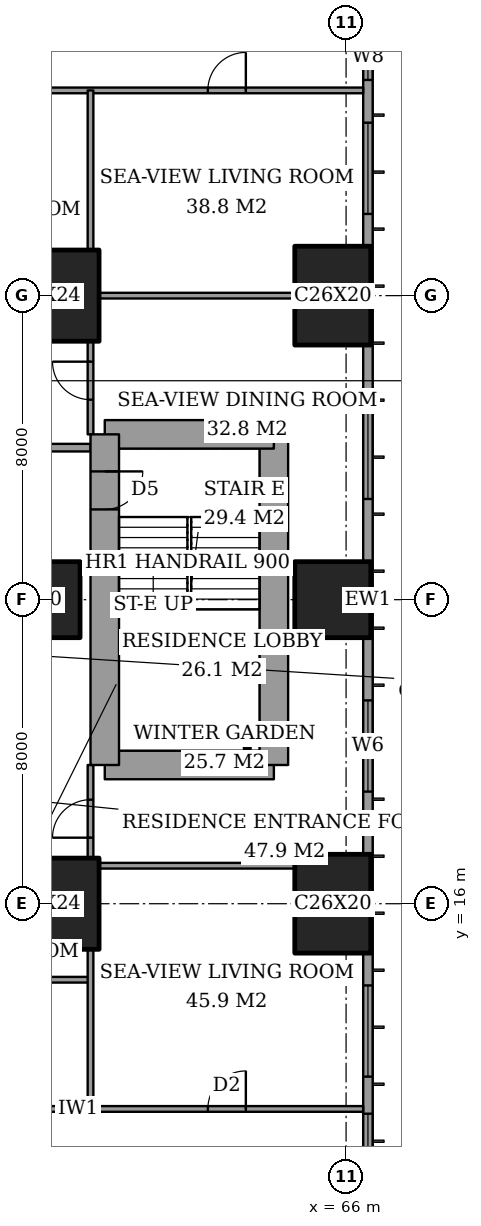
"""IFC4 building model, lengths in metres.
Left out: names, types, materials, properties, quantities, classifications, styles, units other than length and angle.
Written with IfcOpenShell. Run it as: python <this file> out.ifc"""

import sys

from ifc_helpers import new_model, si_unit, direction, frame, frame_2d, origin, origin_2d, place, context, subcontext, project, spatial, rectangle, extrude, element, fill, save


model = new_model("IFC4")
c1 = context("Model", 3, precision=1e-05, world=origin(), true_north=direction((0.0, 1.0)))
c2 = subcontext(c1, "Body", "Model", "MODEL_VIEW")
j1 = project(units=[si_unit("LENGTHUNIT", "METRE"), si_unit("PLANEANGLEUNIT", "RADIAN")], contexts=[c1])
p1 = place(None, origin())
s1 = spatial("IfcSite", under=j1, at=p1, CompositionType="ELEMENT")
p2 = place(p1, origin())
s2 = spatial("IfcBuilding", under=s1, at=p2, CompositionType="ELEMENT")
p3 = place(p2, frame((0.0, 0.0, 80.0)))
s3 = spatial("IfcBuildingStorey", under=s2, at=p3, CompositionType="ELEMENT", Elevation=80.0)
p4 = place(p3, frame((58.0, 16.0, 0.0), z_axis=(0.0, 0.0, 1.0), x_axis=(1.0, 0.0, 0.0)))
e1 = element("IfcColumn", 1, at=p4, inside=s3, PredefinedType="COLUMN", context=c2, shape_type="SweptSolid", body=[
    extrude(rectangle(XDim=3.0, YDim=2.4, at=origin_2d()), origin(), (0.0, 0.0, 1.0), 3.6),
])
p5 = place(p3, frame((58.0, 24.0, 0.0), z_axis=(0.0, 0.0, 1.0), x_axis=(1.0, 0.0, 0.0)))
e2 = element("IfcColumn", 2, at=p5, inside=s3, PredefinedType="COLUMN", context=c2, shape_type="SweptSolid", body=[
    extrude(rectangle(XDim=2.0, YDim=2.0, at=origin_2d()), origin(), (0.0, 0.0, 1.0), 3.6),
])
p6 = place(p3, frame((58.0, 32.0, 0.0), z_axis=(0.0, 0.0, 1.0), x_axis=(1.0, 0.0, 0.0)))
e3 = element("IfcColumn", 3, at=p6, inside=s3, PredefinedType="COLUMN", context=c2, shape_type="SweptSolid", body=[
    extrude(rectangle(XDim=3.0, YDim=2.4, at=origin_2d()), origin(), (0.0, 0.0, 1.0), 3.6),
])
p7 = place(p3, frame((65.65, 16.0, 0.0), z_axis=(0.0, 0.0, 1.0), x_axis=(0.0, 1.0, 0.0)))
e4 = element("IfcColumn", 4, at=p7, inside=s3, PredefinedType="COLUMN", context=c2, shape_type="SweptSolid", body=[
    extrude(rectangle(XDim=2.6, YDim=2.0, at=origin_2d()), origin(), (0.0, 0.0, 1.0), 3.6),
])
p8 = place(p3, frame((65.65, 24.0, 0.0), z_axis=(0.0, 0.0, 1.0), x_axis=(1.0, 0.0, 0.0)))
e5 = element("IfcColumn", 5, at=p8, inside=s3, PredefinedType="COLUMN", context=c2, shape_type="SweptSolid", body=[
    extrude(rectangle(XDim=2.0, YDim=2.0, at=origin_2d()), origin(), (0.0, 0.0, 1.0), 3.6),
])
p9 = place(p3, frame((65.65, 32.0, 0.0), z_axis=(0.0, 0.0, 1.0), x_axis=(0.0, 1.0, 0.0)))
e6 = element("IfcColumn", 6, at=p9, inside=s3, PredefinedType="COLUMN", context=c2, shape_type="SweptSolid", body=[
    extrude(rectangle(XDim=2.6, YDim=2.0, at=origin_2d()), origin(), (0.0, 0.0, 1.0), 3.6),
])
p10 = place(p3, frame((59.65, 19.65, 0.0), z_axis=(0.0, 0.0, 1.0), x_axis=(1.0, 0.0, 0.0)))
e7 = element("IfcWall", 7, at=p10, inside=s3, PredefinedType="SHEAR", context=c2, shape_type="SweptSolid", body=[
    extrude(rectangle(XDim=4.45, YDim=0.75, at=frame_2d((2.225, 0.0))), origin(), (0.0, 0.0, 1.0), 3.6),
])
p11 = place(p3, frame((64.1, 19.65, 0.0), z_axis=(0.0, 0.0, 1.0), x_axis=(0.0, 1.0, 0.0)))
e8 = element("IfcWall", 8, at=p11, inside=s3, PredefinedType="SHEAR", context=c2, shape_type="SweptSolid", body=[
    extrude(rectangle(XDim=8.7, YDim=0.75, at=frame_2d((4.35, 0.0))), origin(), (0.0, 0.0, 1.0), 3.6),
])
p12 = place(p3, frame((64.1, 28.35, 0.0), z_axis=(0.0, 0.0, 1.0), x_axis=(-1.0, 0.0, 0.0)))
e9 = element("IfcWall", 9, at=p12, inside=s3, PredefinedType="SHEAR", context=c2, shape_type="SweptSolid", body=[
    extrude(rectangle(XDim=4.45, YDim=0.75, at=frame_2d((2.225, 0.0))), origin(), (0.0, 0.0, 1.0), 3.6),
])
p13 = place(p3, frame((59.65, 28.35, 0.0), z_axis=(0.0, 0.0, 1.0), x_axis=(0.0, -1.0, 0.0)))
e10 = element("IfcWall", 10, at=p13, inside=s3, PredefinedType="SHEAR", context=c2, shape_type="SweptSolid", body=[
    extrude(rectangle(XDim=8.7, YDim=0.75, at=frame_2d((4.35, 0.0))), origin(), (0.0, 0.0, 1.0), 3.6),
])
p14 = place(p13, frame((0.975, 0.0, 0.0)))
e11 = element("IfcOpeningElement", 11, at=p14, cuts=e10, PredefinedType="OPENING", context=c2, shape_type="SweptSolid", body=[
    extrude(rectangle(XDim=1.0, YDim=2.1, at=frame_2d((0.5, 1.05))), frame((0.0, 0.385, 0.0), z_axis=(0.0, -1.0, 0.0), x_axis=(1.0, 0.0, 0.0)), (0.0, 0.0, 1.0), 0.77),
])
p15 = place(p3, frame((66.575, 3.175, 0.0), z_axis=(0.0, 0.0, 1.0), x_axis=(0.0, 1.0, 0.0)))
e12 = element("IfcWall", 12, at=p15, inside=s3, PredefinedType="SOLIDWALL", context=c2, shape_type="SweptSolid", body=[
    extrude(rectangle(XDim=41.65, YDim=0.25, at=frame_2d((20.825, 0.0))), origin(), (0.0, 0.0, 1.0), 3.6),
])
p16 = place(p15, frame((0.775, 0.0, 0.6)))
e13 = element("IfcOpeningElement", 13, at=p16, cuts=e12, PredefinedType="OPENING", context=c2, shape_type="SweptSolid", body=[
    extrude(rectangle(XDim=2.4, YDim=2.0, at=frame_2d((1.2, 1.0))), frame((0.0, 0.135, 0.0), z_axis=(0.0, -1.0, 0.0), x_axis=(1.0, 0.0, 0.0)), (0.0, 0.0, 1.0), 0.27),
])
p17 = place(p15, frame((6.1, 0.0, 0.6)))
e14 = element("IfcOpeningElement", 14, at=p17, cuts=e12, PredefinedType="OPENING", context=c2, shape_type="SweptSolid", body=[
    extrude(rectangle(XDim=1.2, YDim=2.0, at=frame_2d((0.6, 1.0))), frame((0.0, 0.135, 0.0), z_axis=(0.0, -1.0, 0.0), x_axis=(1.0, 0.0, 0.0)), (0.0, 0.0, 1.0), 0.27),
])
p18 = place(p15, frame((8.275, 0.0, 0.6)))
e15 = element("IfcOpeningElement", 15, at=p18, cuts=e12, PredefinedType="OPENING", context=c2, shape_type="SweptSolid", body=[
    extrude(rectangle(XDim=2.4, YDim=2.0, at=frame_2d((1.2, 1.0))), frame((0.0, 0.135, 0.0), z_axis=(0.0, -1.0, 0.0), x_axis=(1.0, 0.0, 0.0)), (0.0, 0.0, 1.0), 0.27),
])
p19 = place(p15, frame((15.775, 0.0, 0.6)))
e16 = element("IfcOpeningElement", 16, at=p19, cuts=e12, PredefinedType="OPENING", context=c2, shape_type="SweptSolid", body=[
    extrude(rectangle(XDim=2.4, YDim=2.0, at=frame_2d((1.2, 1.0))), frame((0.0, 0.135, 0.0), z_axis=(0.0, -1.0, 0.0), x_axis=(1.0, 0.0, 0.0)), (0.0, 0.0, 1.0), 0.27),
])
p20 = place(p15, frame((23.475, 0.0, 0.6)))
e17 = element("IfcOpeningElement", 17, at=p20, cuts=e12, PredefinedType="OPENING", context=c2, shape_type="SweptSolid", body=[
    extrude(rectangle(XDim=2.4, YDim=2.0, at=frame_2d((1.2, 1.0))), frame((0.0, 0.135, 0.0), z_axis=(0.0, -1.0, 0.0), x_axis=(1.0, 0.0, 0.0)), (0.0, 0.0, 1.0), 0.27),
])
p21 = place(p15, frame((30.975, 0.0, 0.6)))
e18 = element("IfcOpeningElement", 18, at=p21, cuts=e12, PredefinedType="OPENING", context=c2, shape_type="SweptSolid", body=[
    extrude(rectangle(XDim=2.4, YDim=2.0, at=frame_2d((1.2, 1.0))), frame((0.0, 0.135, 0.0), z_axis=(0.0, -1.0, 0.0), x_axis=(1.0, 0.0, 0.0)), (0.0, 0.0, 1.0), 0.27),
])
p22 = place(p15, frame((34.5, 0.0, 0.6)))
e19 = element("IfcOpeningElement", 19, at=p22, cuts=e12, PredefinedType="OPENING", context=c2, shape_type="SweptSolid", body=[
    extrude(rectangle(XDim=1.2, YDim=2.0, at=frame_2d((0.6, 1.0))), frame((0.0, 0.135, 0.0), z_axis=(0.0, -1.0, 0.0), x_axis=(1.0, 0.0, 0.0)), (0.0, 0.0, 1.0), 0.27),
])
p23 = place(p15, frame((38.475, 0.0, 0.6)))
e20 = element("IfcOpeningElement", 20, at=p23, cuts=e12, PredefinedType="OPENING", context=c2, shape_type="SweptSolid", body=[
    extrude(rectangle(XDim=2.4, YDim=2.0, at=frame_2d((1.2, 1.0))), frame((0.0, 0.135, 0.0), z_axis=(0.0, -1.0, 0.0), x_axis=(1.0, 0.0, 0.0)), (0.0, 0.0, 1.0), 0.27),
])
p24 = place(p3, frame((41.439, 10.6, 0.0), z_axis=(0.0, 0.0, 1.0), x_axis=(1.0, 0.0, 0.0)))
e21 = element("IfcWall", 21, at=p24, inside=s3, PredefinedType="PARTITIONING", context=c2, shape_type="SweptSolid", body=[
    extrude(rectangle(XDim=25.011, YDim=0.15, at=frame_2d((12.505, 0.0))), origin(), (0.0, 0.0, 1.0), 3.35),
])
p25 = place(p24, frame((10.761, 0.0, 0.0)))
e22 = element("IfcOpeningElement", 22, at=p25, cuts=e21, PredefinedType="OPENING", context=c2, shape_type="SweptSolid", body=[
    extrude(rectangle(XDim=1.0, YDim=2.1, at=frame_2d((0.5, 1.05))), frame((0.0, 0.085, 0.0), z_axis=(0.0, -1.0, 0.0), x_axis=(1.0, 0.0, 0.0)), (0.0, 0.0, 1.0), 0.17),
])
p26 = place(p24, frame((20.924, 0.0, 0.0)))
e23 = element("IfcOpeningElement", 23, at=p26, cuts=e21, PredefinedType="OPENING", context=c2, shape_type="SweptSolid", body=[
    extrude(rectangle(XDim=1.0, YDim=2.1, at=frame_2d((0.5, 1.05))), frame((0.0, 0.085, 0.0), z_axis=(0.0, -1.0, 0.0), x_axis=(1.0, 0.0, 0.0)), (0.0, 0.0, 1.0), 0.17),
])
p27 = place(p24, frame((15.749, 0.0, 0.0)))
e24 = element("IfcOpeningElement", 24, at=p27, cuts=e21, PredefinedType="OPENING", context=c2, shape_type="SweptSolid", body=[
    extrude(rectangle(XDim=0.9, YDim=2.1, at=frame_2d((0.45, 1.05))), frame((0.0, 0.085, 0.0), z_axis=(0.0, -1.0, 0.0), x_axis=(1.0, 0.0, 0.0)), (0.0, 0.0, 1.0), 0.17),
])
p28 = place(p24, frame((12.961, 0.0, 0.0)))
e25 = element("IfcOpeningElement", 25, at=p28, cuts=e21, PredefinedType="OPENING", context=c2, shape_type="SweptSolid", body=[
    extrude(rectangle(XDim=1.0, YDim=2.1, at=frame_2d((0.5, 1.05))), frame((0.0, 0.085, 0.0), z_axis=(0.0, -1.0, 0.0), x_axis=(1.0, 0.0, 0.0)), (0.0, 0.0, 1.0), 0.17),
])
p29 = place(p24, frame((7.861, 0.0, 0.0)))
e26 = element("IfcOpeningElement", 26, at=p29, cuts=e21, PredefinedType="OPENING", context=c2, shape_type="SweptSolid", body=[
    extrude(rectangle(XDim=1.0, YDim=2.1, at=frame_2d((0.5, 1.05))), frame((0.0, 0.085, 0.0), z_axis=(0.0, -1.0, 0.0), x_axis=(1.0, 0.0, 0.0)), (0.0, 0.0, 1.0), 0.17),
])
p30 = place(p24, frame((2.836, 0.0, 0.0)))
e27 = element("IfcOpeningElement", 27, at=p30, cuts=e21, PredefinedType="OPENING", context=c2, shape_type="SweptSolid", body=[
    extrude(rectangle(XDim=1.0, YDim=2.1, at=frame_2d((0.5, 1.05))), frame((0.0, 0.085, 0.0), z_axis=(0.0, -1.0, 0.0), x_axis=(1.0, 0.0, 0.0)), (0.0, 0.0, 1.0), 0.17),
])
p31 = place(p3, frame((56.0, 14.0, 0.0), z_axis=(0.0, 0.0, 1.0), x_axis=(1.0, 0.0, 0.0)))
e28 = element("IfcWall", 28, at=p31, inside=s3, PredefinedType="PARTITIONING", context=c2, shape_type="SweptSolid", body=[
    extrude(rectangle(XDim=3.275, YDim=0.15, at=frame_2d((1.637, 0.0))), origin(), (0.0, 0.0, 1.0), 3.35),
])
p32 = place(p3, frame((59.5, 17.0, 0.0), z_axis=(0.0, 0.0, 1.0), x_axis=(1.0, 0.0, 0.0)))
e29 = element("IfcWall", 29, at=p32, inside=s3, PredefinedType="PARTITIONING", context=c2, shape_type="SweptSolid", body=[
    extrude(rectangle(XDim=5.15, YDim=0.15, at=frame_2d((2.575, 0.0))), origin(), (0.0, 0.0, 1.0), 3.35),
])
p33 = place(p3, frame((42.0, 28.0, 0.0), z_axis=(0.0, 0.0, 1.0), x_axis=(1.0, 0.0, 0.0)))
e30 = element("IfcWall", 30, at=p33, inside=s3, PredefinedType="PARTITIONING", context=c2, shape_type="SweptSolid", body=[
    extrude(rectangle(XDim=17.275, YDim=0.2, at=frame_2d((8.637, 0.0))), origin(), (0.0, 0.0, 1.0), 3.35),
])
p34 = place(p33, frame((9.4, 0.0, 0.0)))
e31 = element("IfcOpeningElement", 31, at=p34, cuts=e30, PredefinedType="OPENING", context=c2, shape_type="SweptSolid", body=[
    extrude(rectangle(XDim=1.2, YDim=2.4, at=frame_2d((0.6, 1.2))), frame((0.0, 0.11, 0.0), z_axis=(0.0, -1.0, 0.0), x_axis=(1.0, 0.0, 0.0)), (0.0, 0.0, 1.0), 0.22),
])
p35 = place(p3, frame((59.5, 32.0, 0.0), z_axis=(0.0, 0.0, 1.0), x_axis=(1.0, 0.0, 0.0)))
e32 = element("IfcWall", 32, at=p35, inside=s3, PredefinedType="PARTITIONING", context=c2, shape_type="SweptSolid", body=[
    extrude(rectangle(XDim=5.15, YDim=0.15, at=frame_2d((2.575, 0.0))), origin(), (0.0, 0.0, 1.0), 2.634),
])
p36 = place(p3, frame((41.439, 37.4, 0.0), z_axis=(0.0, 0.0, 1.0), x_axis=(1.0, 0.0, 0.0)))
e33 = element("IfcWall", 33, at=p36, inside=s3, PredefinedType="PARTITIONING", context=c2, shape_type="SweptSolid", body=[
    extrude(rectangle(XDim=25.011, YDim=0.15, at=frame_2d((12.505, 0.0))), origin(), (0.0, 0.0, 1.0), 3.35),
])
p37 = place(p36, frame((10.761, 0.0, 0.0)))
e34 = element("IfcOpeningElement", 34, at=p37, cuts=e33, PredefinedType="OPENING", context=c2, shape_type="SweptSolid", body=[
    extrude(rectangle(XDim=1.0, YDim=2.1, at=frame_2d((0.5, 1.05))), frame((0.0, 0.085, 0.0), z_axis=(0.0, -1.0, 0.0), x_axis=(1.0, 0.0, 0.0)), (0.0, 0.0, 1.0), 0.17),
])
p38 = place(p36, frame((20.924, 0.0, 0.0)))
e35 = element("IfcOpeningElement", 35, at=p38, cuts=e33, PredefinedType="OPENING", context=c2, shape_type="SweptSolid", body=[
    extrude(rectangle(XDim=1.0, YDim=2.1, at=frame_2d((0.5, 1.05))), frame((0.0, 0.085, 0.0), z_axis=(0.0, -1.0, 0.0), x_axis=(1.0, 0.0, 0.0)), (0.0, 0.0, 1.0), 0.17),
])
p39 = place(p36, frame((15.749, 0.0, 0.0)))
e36 = element("IfcOpeningElement", 36, at=p39, cuts=e33, PredefinedType="OPENING", context=c2, shape_type="SweptSolid", body=[
    extrude(rectangle(XDim=0.9, YDim=2.1, at=frame_2d((0.45, 1.05))), frame((0.0, 0.085, 0.0), z_axis=(0.0, -1.0, 0.0), x_axis=(1.0, 0.0, 0.0)), (0.0, 0.0, 1.0), 0.17),
])
p40 = place(p36, frame((12.961, 0.0, 0.0)))
e37 = element("IfcOpeningElement", 37, at=p40, cuts=e33, PredefinedType="OPENING", context=c2, shape_type="SweptSolid", body=[
    extrude(rectangle(XDim=1.0, YDim=2.1, at=frame_2d((0.5, 1.05))), frame((0.0, 0.085, 0.0), z_axis=(0.0, -1.0, 0.0), x_axis=(1.0, 0.0, 0.0)), (0.0, 0.0, 1.0), 0.17),
])
p41 = place(p36, frame((7.861, 0.0, 0.0)))
e38 = element("IfcOpeningElement", 38, at=p41, cuts=e33, PredefinedType="OPENING", context=c2, shape_type="SweptSolid", body=[
    extrude(rectangle(XDim=1.0, YDim=2.1, at=frame_2d((0.5, 1.05))), frame((0.0, 0.085, 0.0), z_axis=(0.0, -1.0, 0.0), x_axis=(1.0, 0.0, 0.0)), (0.0, 0.0, 1.0), 0.17),
])
p42 = place(p36, frame((2.836, 0.0, 0.0)))
e39 = element("IfcOpeningElement", 39, at=p42, cuts=e33, PredefinedType="OPENING", context=c2, shape_type="SweptSolid", body=[
    extrude(rectangle(XDim=1.0, YDim=2.1, at=frame_2d((0.5, 1.05))), frame((0.0, 0.085, 0.0), z_axis=(0.0, -1.0, 0.0), x_axis=(1.0, 0.0, 0.0)), (0.0, 0.0, 1.0), 0.17),
])
p43 = place(p3, frame((59.275, 10.6, 0.0), z_axis=(0.0, 0.0, 1.0), x_axis=(0.0, 1.0, 0.0)))
e40 = element("IfcWall", 40, at=p43, inside=s3, PredefinedType="PARTITIONING", context=c2, shape_type="SweptSolid", body=[
    extrude(rectangle(XDim=4.2, YDim=0.15, at=frame_2d((2.1, 0.0))), origin(), (0.0, 0.0, 1.0), 3.35),
])
p44 = place(p3, frame((59.275, 17.2, 0.0), z_axis=(0.0, 0.0, 1.0), x_axis=(0.0, 1.0, 0.0)))
e41 = element("IfcWall", 41, at=p44, inside=s3, PredefinedType="PARTITIONING", context=c2, shape_type="SweptSolid", body=[
    extrude(rectangle(XDim=2.45, YDim=0.15, at=frame_2d((1.225, 0.0))), origin(), (0.0, 0.0, 1.0), 3.35),
])
p45 = place(p44, frame((0.538, 0.0, 0.0)))
e42 = element("IfcOpeningElement", 42, at=p45, cuts=e41, PredefinedType="OPENING", context=c2, shape_type="SweptSolid", body=[
    extrude(rectangle(XDim=1.0, YDim=2.1, at=frame_2d((0.5, 1.05))), frame((0.0, 0.085, 0.0), z_axis=(0.0, -1.0, 0.0), x_axis=(1.0, 0.0, 0.0)), (0.0, 0.0, 1.0), 0.17),
])
p46 = place(p3, frame((59.275, 28.35, 0.0), z_axis=(0.0, 0.0, 1.0), x_axis=(0.0, 1.0, 0.0)))
e43 = element("IfcWall", 43, at=p46, inside=s3, PredefinedType="PARTITIONING", context=c2, shape_type="SweptSolid", body=[
    extrude(rectangle(XDim=2.45, YDim=0.15, at=frame_2d((1.225, 0.0))), origin(), (0.0, 0.0, 1.0), 3.35),
])
p47 = place(p46, frame((0.913, 0.0, 0.0)))
e44 = element("IfcOpeningElement", 44, at=p47, cuts=e43, PredefinedType="OPENING", context=c2, shape_type="SweptSolid", body=[
    extrude(rectangle(XDim=1.0, YDim=2.1, at=frame_2d((0.5, 1.05))), frame((0.0, 0.085, 0.0), z_axis=(0.0, -1.0, 0.0), x_axis=(1.0, 0.0, 0.0)), (0.0, 0.0, 1.0), 0.17),
])
p48 = place(p3, frame((59.275, 33.2, 0.0), z_axis=(0.0, 0.0, 1.0), x_axis=(0.0, 1.0, 0.0)))
e45 = element("IfcWall", 45, at=p48, inside=s3, PredefinedType="PARTITIONING", context=c2, shape_type="SweptSolid", body=[
    extrude(rectangle(XDim=4.2, YDim=0.15, at=frame_2d((2.1, 0.0))), origin(), (0.0, 0.0, 1.0), 3.35),
])
p49 = place(p17, origin())
e46 = element("IfcWindow", 46, at=p49, inside=s3, PartitioningType="SINGLE_PANEL", PredefinedType="WINDOW", context=c2, shape_type="SweptSolid", body=[
    extrude(rectangle(XDim=1.2, YDim=2.0, at=frame_2d((0.6, 1.0))), frame((0.0, 0.03, 0.0), z_axis=(0.0, -1.0, 0.0), x_axis=(1.0, 0.0, 0.0)), (0.0, 0.0, 1.0), 0.06),
])
fill(e14, e46)
p50 = place(p18, origin())
e47 = element("IfcWindow", 47, at=p50, inside=s3, PartitioningType="SINGLE_PANEL", PredefinedType="WINDOW", context=c2, shape_type="SweptSolid", body=[
    extrude(rectangle(XDim=2.4, YDim=2.0, at=frame_2d((1.2, 1.0))), frame((0.0, 0.03, 0.0), z_axis=(0.0, -1.0, 0.0), x_axis=(1.0, 0.0, 0.0)), (0.0, 0.0, 1.0), 0.06),
])
fill(e15, e47)
p51 = place(p19, origin())
e48 = element("IfcWindow", 48, at=p51, inside=s3, PartitioningType="SINGLE_PANEL", PredefinedType="WINDOW", context=c2, shape_type="SweptSolid", body=[
    extrude(rectangle(XDim=2.4, YDim=2.0, at=frame_2d((1.2, 1.0))), frame((0.0, 0.03, 0.0), z_axis=(0.0, -1.0, 0.0), x_axis=(1.0, 0.0, 0.0)), (0.0, 0.0, 1.0), 0.06),
])
fill(e16, e48)
p52 = place(p20, origin())
e49 = element("IfcWindow", 49, at=p52, inside=s3, PartitioningType="SINGLE_PANEL", PredefinedType="WINDOW", context=c2, shape_type="SweptSolid", body=[
    extrude(rectangle(XDim=2.4, YDim=2.0, at=frame_2d((1.2, 1.0))), frame((0.0, 0.03, 0.0), z_axis=(0.0, -1.0, 0.0), x_axis=(1.0, 0.0, 0.0)), (0.0, 0.0, 1.0), 0.06),
])
fill(e17, e49)
p53 = place(p21, origin())
e50 = element("IfcWindow", 50, at=p53, inside=s3, PartitioningType="SINGLE_PANEL", PredefinedType="WINDOW", context=c2, shape_type="SweptSolid", body=[
    extrude(rectangle(XDim=2.4, YDim=2.0, at=frame_2d((1.2, 1.0))), frame((0.0, 0.03, 0.0), z_axis=(0.0, -1.0, 0.0), x_axis=(1.0, 0.0, 0.0)), (0.0, 0.0, 1.0), 0.06),
])
fill(e18, e50)
p54 = place(p22, origin())
e51 = element("IfcWindow", 51, at=p54, inside=s3, PartitioningType="SINGLE_PANEL", PredefinedType="WINDOW", context=c2, shape_type="SweptSolid", body=[
    extrude(rectangle(XDim=1.2, YDim=2.0, at=frame_2d((0.6, 1.0))), frame((0.0, 0.03, 0.0), z_axis=(0.0, -1.0, 0.0), x_axis=(1.0, 0.0, 0.0)), (0.0, 0.0, 1.0), 0.06),
])
fill(e19, e51)
p55 = place(p26, origin())
e52 = element("IfcDoor", 52, at=p55, inside=s3, OperationType="SINGLE_SWING_LEFT", PredefinedType="DOOR", context=c2, shape_type="SweptSolid", body=[
    extrude(rectangle(XDim=1.0, YDim=2.1, at=frame_2d((0.5, 1.05))), frame((0.0, 0.025, 0.0), z_axis=(0.0, -1.0, 0.0), x_axis=(1.0, 0.0, 0.0)), (0.0, 0.0, 1.0), 0.05),
])
fill(e23, e52)
p56 = place(p45, origin())
e53 = element("IfcDoor", 53, at=p56, inside=s3, OperationType="SINGLE_SWING_RIGHT", PredefinedType="DOOR", context=c2, shape_type="SweptSolid", body=[
    extrude(rectangle(XDim=1.0, YDim=2.1, at=frame_2d((0.5, 1.05))), frame((0.0, 0.025, 0.0), z_axis=(0.0, -1.0, 0.0), x_axis=(1.0, 0.0, 0.0)), (0.0, 0.0, 1.0), 0.05),
])
fill(e42, e53)
p57 = place(p38, origin())
e54 = element("IfcDoor", 54, at=p57, inside=s3, OperationType="SINGLE_SWING_LEFT", PredefinedType="DOOR", context=c2, shape_type="SweptSolid", body=[
    extrude(rectangle(XDim=1.0, YDim=2.1, at=frame_2d((0.5, 1.05))), frame((0.0, 0.025, 0.0), z_axis=(0.0, -1.0, 0.0), x_axis=(1.0, 0.0, 0.0)), (0.0, 0.0, 1.0), 0.05),
])
fill(e35, e54)
p58 = place(p47, origin())
e55 = element("IfcDoor", 55, at=p58, inside=s3, OperationType="SINGLE_SWING_LEFT", PredefinedType="DOOR", context=c2, shape_type="SweptSolid", body=[
    extrude(rectangle(XDim=1.0, YDim=2.1, at=frame_2d((0.5, 1.05))), frame((0.0, 0.025, 0.0), z_axis=(0.0, -1.0, 0.0), x_axis=(1.0, 0.0, 0.0)), (0.0, 0.0, 1.0), 0.05),
])
fill(e44, e55)
p59 = place(p14, origin())
e56 = element("IfcDoor", 56, at=p59, inside=s3, OperationType="SINGLE_SWING_RIGHT", PredefinedType="DOOR", context=c2, shape_type="SweptSolid", body=[
    extrude(rectangle(XDim=1.0, YDim=2.1, at=frame_2d((0.5, 1.05))), frame((0.0, 0.025, 0.0), z_axis=(0.0, -1.0, 0.0), x_axis=(1.0, 0.0, 0.0)), (0.0, 0.0, 1.0), 0.05),
])
fill(e11, e56)
save(model, sys.argv[1])
